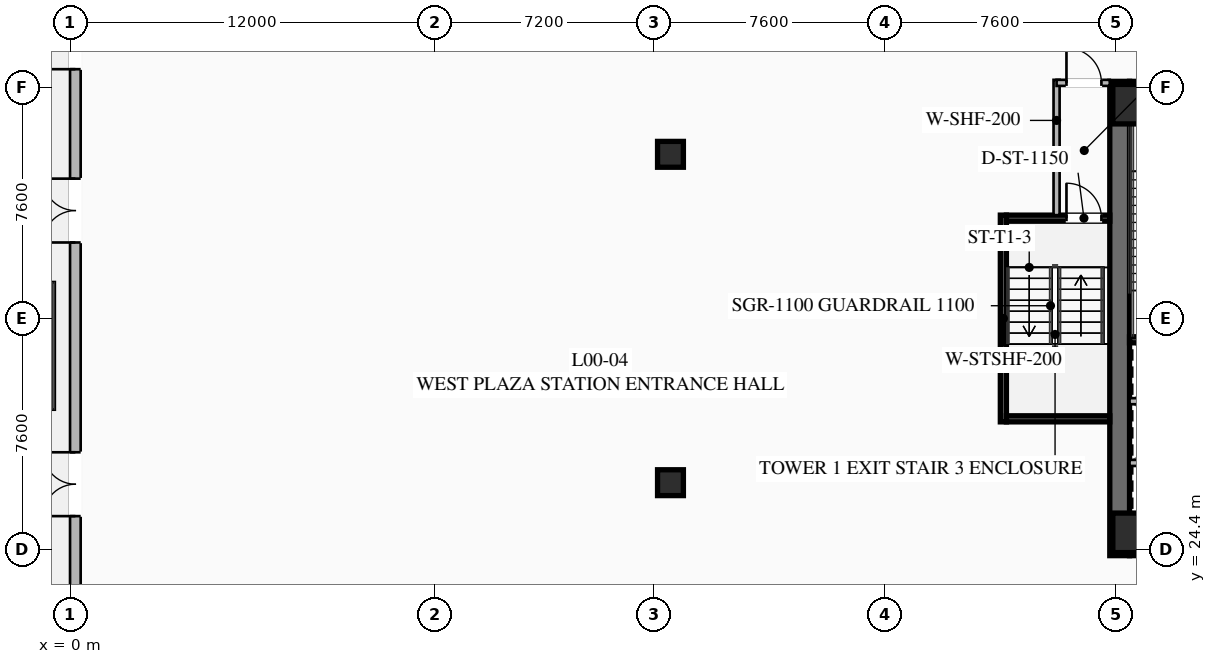
"""IFC4 building model, lengths in metres.
Left out: names, types, materials, properties, quantities, classifications, styles, units other than length and angle.
Written with IfcOpenShell. Run it as: python <this file> out.ifc"""

import sys

from ifc_helpers import new_model, si_unit, direction, frame, frame_2d, origin, origin_2d, place, context, subcontext, project, spatial, rectangle, hollow_rectangle, extrude, element, fill, save


model = new_model("IFC4")
c1 = context("Model", 3, precision=1e-05, world=origin(), true_north=direction((0.0, 1.0)))
c2 = subcontext(c1, "Body", "Model", "MODEL_VIEW")
j1 = project(units=[si_unit("LENGTHUNIT", "METRE"), si_unit("PLANEANGLEUNIT", "RADIAN")], contexts=[c1])
p1 = place(None, origin())
s1 = spatial("IfcSite", under=j1, at=p1, CompositionType="ELEMENT")
p2 = place(p1, origin())
s2 = spatial("IfcBuilding", under=s1, at=p2, CompositionType="ELEMENT")
p3 = place(p2, origin())
s3 = spatial("IfcBuildingStorey", under=s2, at=p3, CompositionType="ELEMENT", Elevation=0.0)
p4 = place(p3, frame((34.525, 24.2, 0.0), z_axis=(0.0, 0.0, 1.0), x_axis=(0.0, 1.0, 0.0)))
e1 = element("IfcWall", 1, at=p4, inside=s3, PredefinedType="SHEAR", context=c2, shape_type="SweptSolid", body=[
    extrude(rectangle(XDim=15.6, YDim=0.65, at=frame_2d((7.8, 0.0))), origin(), (0.0, 0.0, 1.0), 5.4),
])
p5 = place(p3, frame((49.15, 24.525, 0.0), z_axis=(0.0, 0.0, 1.0), x_axis=(-1.0, 0.0, 0.0)))
e2 = element("IfcWall", 2, at=p5, inside=s3, PredefinedType="SHEAR", context=c2, shape_type="SweptSolid", body=[
    extrude(rectangle(XDim=14.3, YDim=0.65, at=frame_2d((7.15, 0.0))), origin(), (0.0, 0.0, 1.0), 5.4),
])
p6 = place(p5, frame((8.85, 0.0, 0.0)))
e3 = element("IfcOpeningElement", 3, at=p6, cuts=e2, PredefinedType="OPENING", context=c2, shape_type="SweptSolid", body=[
    extrude(rectangle(XDim=1.25, YDim=2.25, at=frame_2d((0.625, 1.125))), frame((0.0, 0.335, 0.0), z_axis=(0.0, -1.0, 0.0), x_axis=(1.0, 0.0, 0.0)), (0.0, 0.0, 1.0), 0.67),
])
p7 = place(p5, frame((3.8, 0.0, 0.0)))
e4 = element("IfcOpeningElement", 4, at=p7, cuts=e2, PredefinedType="OPENING", context=c2, shape_type="SweptSolid", body=[
    extrude(rectangle(XDim=1.25, YDim=2.25, at=frame_2d((0.625, 1.125))), frame((0.0, 0.335, 0.0), z_axis=(0.0, -1.0, 0.0), x_axis=(1.0, 0.0, 0.0)), (0.0, 0.0, 1.0), 0.67),
])
p8 = place(p3, frame((34.85, 39.475, 0.0), z_axis=(0.0, 0.0, 1.0), x_axis=(1.0, 0.0, 0.0)))
e5 = element("IfcWall", 5, at=p8, inside=s3, PredefinedType="SHEAR", context=c2, shape_type="SweptSolid", body=[
    extrude(rectangle(XDim=14.3, YDim=0.65, at=frame_2d((7.15, 0.0))), origin(), (0.0, 0.0, 1.0), 5.4),
])
p9 = place(p8, frame((4.2, 0.0, 0.0)))
e6 = element("IfcOpeningElement", 6, at=p9, cuts=e5, PredefinedType="OPENING", context=c2, shape_type="SweptSolid", body=[
    extrude(rectangle(XDim=1.25, YDim=2.25, at=frame_2d((0.625, 1.125))), frame((0.0, 0.335, 0.0), z_axis=(0.0, -1.0, 0.0), x_axis=(1.0, 0.0, 0.0)), (0.0, 0.0, 1.0), 0.67),
])
p10 = place(p8, frame((9.25, 0.0, 0.0)))
e7 = element("IfcOpeningElement", 7, at=p10, cuts=e5, PredefinedType="OPENING", context=c2, shape_type="SweptSolid", body=[
    extrude(rectangle(XDim=1.25, YDim=2.25, at=frame_2d((0.625, 1.125))), frame((0.0, 0.335, 0.0), z_axis=(0.0, -1.0, 0.0), x_axis=(1.0, 0.0, 0.0)), (0.0, 0.0, 1.0), 0.67),
])
for number, where, z_axis, x_axis in (
    (8, (34.95, 24.95, 0.0), (0.0, 0.0, 1.0), (1.0, 0.0, 0.0)),
    (9, (34.95, 39.05, 0.0), (0.0, 0.0, 1.0), (1.0, 0.0, 0.0)),
):
    element("IfcColumn", number, at=place(p3, frame(where, z_axis=z_axis, x_axis=x_axis)), inside=s3, PredefinedType="COLUMN", context=c2, shape_type="SweptSolid", body=[
        extrude(hollow_rectangle(XDim=1.3, YDim=1.3, WallThickness=0.05, at=origin_2d()), origin(), (0.0, 0.0, 1.0), 5.14),
    ])
for number, where, z_axis, x_axis in (
    (10, (19.75, 37.4, 0.0), (0.0, 0.0, 1.0), (1.0, 0.0, 0.0)),
    (11, (19.75, 26.6, 0.0), (0.0, 0.0, 1.0), (1.0, 0.0, 0.0)),
):
    element("IfcColumn", number, at=place(p3, frame(where, z_axis=z_axis, x_axis=x_axis)), inside=s3, PredefinedType="COLUMN", context=c2, shape_type="SweptSolid", body=[
        extrude(hollow_rectangle(XDim=0.85, YDim=0.85, WallThickness=0.035, at=origin_2d()), origin(), (0.0, 0.0, 1.0), 5.14),
    ])
p11 = place(p3, frame((0.175, 0.35, 0.0), z_axis=(0.0, 0.0, 1.0), x_axis=(0.0, 1.0, 0.0)))
e12 = element("IfcWall", 12, at=p11, inside=s3, PredefinedType="SOLIDWALL", context=c2, shape_type="SweptSolid", body=[
    extrude(rectangle(XDim=63.3, YDim=0.35, at=frame_2d((31.65, 0.0))), origin(), (0.0, 0.0, 1.0), 5.14),
])
p12 = place(p11, frame((16.15, 0.0, 0.0)))
e13 = element("IfcOpeningElement", 13, at=p12, cuts=e12, PredefinedType="OPENING", context=c2, shape_type="SweptSolid", body=[
    extrude(rectangle(XDim=2.1, YDim=2.5, at=frame_2d((1.05, 1.25))), frame((0.0, 0.185, 0.0), z_axis=(0.0, -1.0, 0.0), x_axis=(1.0, 0.0, 0.0)), (0.0, 0.0, 1.0), 0.37),
])
p13 = place(p11, frame((25.15, 0.0, 0.0)))
e14 = element("IfcOpeningElement", 14, at=p13, cuts=e12, PredefinedType="OPENING", context=c2, shape_type="SweptSolid", body=[
    extrude(rectangle(XDim=2.1, YDim=2.5, at=frame_2d((1.05, 1.25))), frame((0.0, 0.185, 0.0), z_axis=(0.0, -1.0, 0.0), x_axis=(1.0, 0.0, 0.0)), (0.0, 0.0, 1.0), 0.37),
])
p14 = place(p11, frame((34.15, 0.0, 0.0)))
e15 = element("IfcOpeningElement", 15, at=p14, cuts=e12, PredefinedType="OPENING", context=c2, shape_type="SweptSolid", body=[
    extrude(rectangle(XDim=2.1, YDim=2.5, at=frame_2d((1.05, 1.25))), frame((0.0, 0.185, 0.0), z_axis=(0.0, -1.0, 0.0), x_axis=(1.0, 0.0, 0.0)), (0.0, 0.0, 1.0), 0.37),
])
p15 = place(p11, frame((39.85, 0.0, 0.0)))
e16 = element("IfcOpeningElement", 16, at=p15, cuts=e12, PredefinedType="OPENING", context=c2, shape_type="SweptSolid", body=[
    extrude(rectangle(XDim=2.1, YDim=2.5, at=frame_2d((1.05, 1.25))), frame((0.0, 0.185, 0.0), z_axis=(0.0, -1.0, 0.0), x_axis=(1.0, 0.0, 0.0)), (0.0, 0.0, 1.0), 0.37),
])
for number, where, z_axis, x_axis in (
    (17, (34.85, 31.3, 0.0), (0.0, 0.0, 1.0), (1.0, 0.0, 0.0)),
    (18, (34.85, 38.7, 0.0), (0.0, 0.0, 1.0), (1.0, 0.0, 0.0)),
):
    element("IfcWall", number, at=place(p3, frame(where, z_axis=z_axis, x_axis=x_axis)), inside=s3, PredefinedType="SHEAR", context=c2, shape_type="SweptSolid", body=[
        extrude(rectangle(XDim=3.45, YDim=0.2, at=frame_2d((1.725, 0.0))), origin(), (0.0, 0.0, 1.0), 5.14),
    ])
for number, where, z_axis, x_axis in (
    (19, (34.85, 27.25, 0.0), (0.0, 0.0, 1.0), (1.0, 0.0, 0.0)),
    (20, (34.85, 29.28, 0.0), (0.0, 0.0, 1.0), (1.0, 0.0, 0.0)),
):
    element("IfcWall", number, at=place(p3, frame(where, z_axis=z_axis, x_axis=x_axis)), inside=s3, PredefinedType="SOLIDWALL", context=c2, shape_type="SweptSolid", body=[
        extrude(rectangle(XDim=3.1, YDim=0.2, at=frame_2d((1.55, 0.0))), origin(), (0.0, 0.0, 1.0), 5.14),
    ])
p16 = place(p3, frame((30.7, 28.6, 0.0), z_axis=(0.0, 0.0, 1.0), x_axis=(0.0, 1.0, 0.0)))
e21 = element("IfcWall", 21, at=p16, inside=s3, PredefinedType="SHEAR", context=c2, shape_type="SweptSolid", body=[
    extrude(rectangle(XDim=6.8, YDim=0.2, at=frame_2d((3.4, 0.0))), origin(), (0.0, 0.0, 1.0), 5.14),
])
p17 = place(p3, frame((30.8, 35.3, 0.0), z_axis=(0.0, 0.0, 1.0), x_axis=(1.0, 0.0, 0.0)))
e22 = element("IfcWall", 22, at=p17, inside=s3, PredefinedType="SHEAR", context=c2, shape_type="SweptSolid", body=[
    extrude(rectangle(XDim=3.4, YDim=0.2, at=frame_2d((1.7, 0.0))), origin(), (0.0, 0.0, 1.0), 5.14),
])
p18 = place(p17, frame((1.975, 0.0, 0.0)))
e23 = element("IfcOpeningElement", 23, at=p18, cuts=e22, PredefinedType="OPENING", context=c2, shape_type="SweptSolid", body=[
    extrude(rectangle(XDim=1.15, YDim=2.2, at=frame_2d((0.575, 1.1))), frame((0.0, 0.11, 0.0), z_axis=(0.0, -1.0, 0.0), x_axis=(1.0, 0.0, 0.0)), (0.0, 0.0, 1.0), 0.22),
])
p19 = place(p3, frame((30.8, 28.7, 0.0), z_axis=(0.0, 0.0, 1.0), x_axis=(1.0, 0.0, 0.0)))
e24 = element("IfcWall", 24, at=p19, inside=s3, PredefinedType="SHEAR", context=c2, shape_type="SweptSolid", body=[
    extrude(rectangle(XDim=3.4, YDim=0.2, at=frame_2d((1.7, 0.0))), origin(), (0.0, 0.0, 1.0), 5.14),
])
p20 = place(p3, frame((32.45, 35.4, 0.0), z_axis=(0.0, 0.0, 1.0), x_axis=(0.0, 1.0, 0.0)))
e25 = element("IfcWall", 25, at=p20, inside=s3, PredefinedType="SOLIDWALL", context=c2, shape_type="SweptSolid", body=[
    extrude(rectangle(XDim=4.45, YDim=0.2, at=frame_2d((2.225, 0.0))), origin(), (0.0, 0.0, 1.0), 3.31),
])
p21 = place(p3, frame((32.45, 39.75, 0.0), z_axis=(0.0, 0.0, 1.0), x_axis=(1.0, 0.0, 0.0)))
e26 = element("IfcWall", 26, at=p21, inside=s3, PredefinedType="SOLIDWALL", context=c2, shape_type="SweptSolid", body=[
    extrude(rectangle(XDim=1.75, YDim=0.2, at=frame_2d((0.875, 0.0))), origin(), (0.0, 0.0, 1.0), 3.31),
])
p22 = place(p21, frame((0.325, 0.0, 0.0)))
e27 = element("IfcOpeningElement", 27, at=p22, cuts=e26, PredefinedType="OPENING", context=c2, shape_type="SweptSolid", body=[
    extrude(rectangle(XDim=1.15, YDim=2.2, at=frame_2d((0.575, 1.1))), frame((0.0, 0.11, 0.0), z_axis=(0.0, -1.0, 0.0), x_axis=(1.0, 0.0, 0.0)), (0.0, 0.0, 1.0), 0.22),
])
p23 = place(p13, origin())
e28 = element("IfcDoor", 28, at=p23, inside=s3, OperationType="DOUBLE_DOOR_SINGLE_SWING", PredefinedType="DOOR", context=c2, shape_type="SweptSolid", body=[
    extrude(rectangle(XDim=2.1, YDim=2.5, at=frame_2d((1.05, 1.25))), frame((0.0, 0.025, 0.0), z_axis=(0.0, -1.0, 0.0), x_axis=(1.0, 0.0, 0.0)), (0.0, 0.0, 1.0), 0.05),
])
fill(e14, e28)
p24 = place(p14, origin())
e29 = element("IfcDoor", 29, at=p24, inside=s3, OperationType="DOUBLE_DOOR_SINGLE_SWING", PredefinedType="DOOR", context=c2, shape_type="SweptSolid", body=[
    extrude(rectangle(XDim=2.1, YDim=2.5, at=frame_2d((1.05, 1.25))), frame((0.0, 0.025, 0.0), z_axis=(0.0, -1.0, 0.0), x_axis=(1.0, 0.0, 0.0)), (0.0, 0.0, 1.0), 0.05),
])
fill(e15, e29)
p25 = place(p15, origin())
e30 = element("IfcDoor", 30, at=p25, inside=s3, OperationType="DOUBLE_DOOR_SINGLE_SWING", PredefinedType="DOOR", context=c2, shape_type="SweptSolid", body=[
    extrude(rectangle(XDim=2.1, YDim=2.5, at=frame_2d((1.05, 1.25))), frame((0.0, 0.025, 0.0), z_axis=(0.0, -1.0, 0.0), x_axis=(1.0, 0.0, 0.0)), (0.0, 0.0, 1.0), 0.05),
])
fill(e16, e30)
p26 = place(p18, origin())
e31 = element("IfcDoor", 31, at=p26, inside=s3, OperationType="SINGLE_SWING_LEFT", PredefinedType="DOOR", context=c2, shape_type="SweptSolid", body=[
    extrude(rectangle(XDim=1.15, YDim=2.2, at=frame_2d((0.575, 1.1))), frame((0.0, 0.025, 0.0), z_axis=(0.0, -1.0, 0.0), x_axis=(1.0, 0.0, 0.0)), (0.0, 0.0, 1.0), 0.05),
])
fill(e23, e31)
p27 = place(p22, origin())
e32 = element("IfcDoor", 32, at=p27, inside=s3, OperationType="SINGLE_SWING_LEFT", PredefinedType="DOOR", context=c2, shape_type="SweptSolid", body=[
    extrude(rectangle(XDim=1.15, YDim=2.2, at=frame_2d((0.575, 1.1))), frame((0.0, 0.025, 0.0), z_axis=(0.0, -1.0, 0.0), x_axis=(1.0, 0.0, 0.0)), (0.0, 0.0, 1.0), 0.05),
])
fill(e27, e32)
save(model, sys.argv[1])
